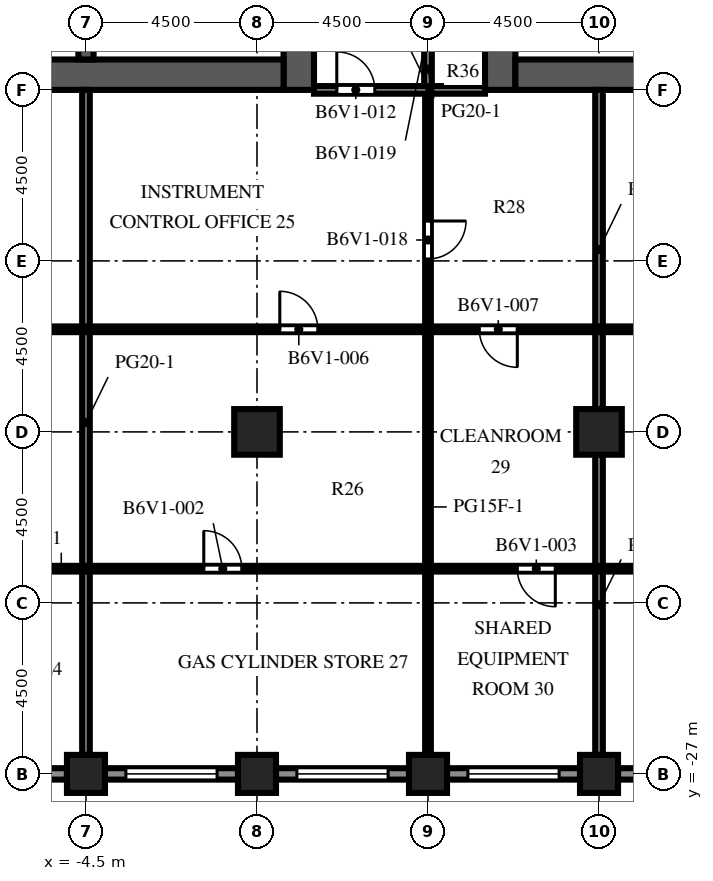
"""IFC4 building model, lengths in metres.
Left out: names, types, materials, properties, quantities, classifications, styles, units other than length and angle.
Written with IfcOpenShell. Run it as: python <this file> out.ifc"""

import sys

from ifc_helpers import new_model, si_unit, direction, frame, frame_2d, origin, origin_2d, place, context, subcontext, project, spatial, rectangle, extrude, element, fill, save


model = new_model("IFC4")
c1 = context("Model", 3, precision=1e-05, world=origin(), true_north=direction((0.0, 1.0)))
c2 = subcontext(c1, "Body", "Model", "MODEL_VIEW")
j1 = project(units=[si_unit("LENGTHUNIT", "METRE"), si_unit("PLANEANGLEUNIT", "RADIAN")], contexts=[c1])
p1 = place(None, origin())
s1 = spatial("IfcSite", under=j1, at=p1, CompositionType="ELEMENT")
p2 = place(p1, origin())
s2 = spatial("IfcBuilding", under=s1, at=p2, CompositionType="ELEMENT")
p3 = place(p2, frame((0.0, 0.0, 207.9)))
s3 = spatial("IfcBuildingStorey", under=s2, at=p3, CompositionType="ELEMENT", Elevation=207.9)
for number, where, z_axis, x_axis in (
    (1, (-4.5, -27.0, 0.0), (0.0, 0.0, 1.0), (1.0, 0.0, 0.0)),
    (2, (0.0, -27.0, 0.0), (0.0, 0.0, 1.0), (1.0, 0.0, 0.0)),
    (3, (4.5, -27.0, 0.0), (0.0, 0.0, 1.0), (1.0, 0.0, 0.0)),
    (4, (9.0, -27.0, 0.0), (0.0, 0.0, 1.0), (1.0, 0.0, 0.0)),
):
    element("IfcColumn", number, at=place(p3, frame(where, z_axis=z_axis, x_axis=x_axis)), inside=s3, PredefinedType="COLUMN", context=c2, shape_type="SweptSolid", body=[
        extrude(rectangle(XDim=1.0, YDim=1.0, at=origin_2d()), origin(), (0.0, 0.0, 1.0), 4.1),
    ])
for number, where, z_axis, x_axis in (
    (5, (0.0, -18.0, 0.0), (0.0, 0.0, 1.0), (1.0, 0.0, 0.0)),
    (6, (9.0, -18.0, 0.0), (0.0, 0.0, 1.0), (1.0, 0.0, 0.0)),
):
    element("IfcColumn", number, at=place(p3, frame(where, z_axis=z_axis, x_axis=x_axis)), inside=s3, PredefinedType="COLUMN", context=c2, shape_type="SweptSolid", body=[
        extrude(rectangle(XDim=1.2, YDim=1.2, at=origin_2d()), origin(), (0.0, 0.0, 1.0), 4.1),
    ])
p4 = place(p3, frame((1.1, -9.0, 0.0), z_axis=(0.0, 0.0, 1.0), x_axis=(0.0, 1.0, 0.0)))
e7 = element("IfcWall", 7, at=p4, inside=s3, PredefinedType="SHEAR", context=c2, shape_type="SweptSolid", body=[
    extrude(rectangle(XDim=27.5, YDim=0.8, at=frame_2d((13.75, 0.0))), origin(), (0.0, 0.0, 1.0), 4.1),
])
p5 = place(p4, frame((12.55, 0.0, 0.0)))
e8 = element("IfcOpeningElement", 8, at=p5, cuts=e7, PredefinedType="OPENING", context=c2, shape_type="SweptSolid", body=[
    extrude(rectangle(XDim=2.4, YDim=2.4, at=frame_2d((1.2, 1.2))), frame((0.0, 0.41, 0.0), z_axis=(0.0, -1.0, 0.0), x_axis=(1.0, 0.0, 0.0)), (0.0, 0.0, 1.0), 0.82),
])
p6 = place(p4, frame((3.95, 0.0, 0.0)))
e9 = element("IfcOpeningElement", 9, at=p6, cuts=e7, PredefinedType="OPENING", context=c2, shape_type="SweptSolid", body=[
    extrude(rectangle(XDim=1.2, YDim=2.1, at=frame_2d((0.6, 1.05))), frame((0.0, 0.41, 0.0), z_axis=(0.0, -1.0, 0.0), x_axis=(1.0, 0.0, 0.0)), (0.0, 0.0, 1.0), 0.82),
])
p7 = place(p4, frame((22.35, 0.0, 0.0)))
e10 = element("IfcOpeningElement", 10, at=p7, cuts=e7, PredefinedType="OPENING", context=c2, shape_type="SweptSolid", body=[
    extrude(rectangle(XDim=1.2, YDim=2.1, at=frame_2d((0.6, 1.05))), frame((0.0, 0.41, 0.0), z_axis=(0.0, -1.0, 0.0), x_axis=(1.0, 0.0, 0.0)), (0.0, 0.0, 1.0), 0.82),
])
p8 = place(p3, frame((-9.7, -8.6, 0.0), z_axis=(0.0, 0.0, 1.0), x_axis=(1.0, 0.0, 0.0)))
e11 = element("IfcWall", 11, at=p8, inside=s3, PredefinedType="SHEAR", context=c2, shape_type="SweptSolid", body=[
    extrude(rectangle(XDim=10.4, YDim=0.8, at=frame_2d((5.2, 0.0))), origin(), (0.0, 0.0, 1.0), 4.1),
])
p9 = place(p3, frame((-4.5, -8.2, 0.0), z_axis=(0.0, 0.0, 1.0), x_axis=(0.0, 1.0, 0.0)))
e12 = element("IfcWall", 12, at=p9, inside=s3, PredefinedType="SHEAR", context=c2, shape_type="SweptSolid", body=[
    extrude(rectangle(XDim=7.5, YDim=0.4, at=frame_2d((3.75, 0.0))), origin(), (0.0, 0.0, 1.0), 4.1),
])
p10 = place(p3, frame((6.4, -9.0, 0.0), z_axis=(0.0, 0.0, 1.0), x_axis=(0.0, 1.0, 0.0)))
e13 = element("IfcWall", 13, at=p10, inside=s3, PredefinedType="SHEAR", context=c2, shape_type="SweptSolid", body=[
    extrude(rectangle(XDim=27.5, YDim=0.8, at=frame_2d((13.75, 0.0))), origin(), (0.0, 0.0, 1.0), 4.1),
])
p11 = place(p10, frame((12.55, 0.0, 0.0)))
e14 = element("IfcOpeningElement", 14, at=p11, cuts=e13, PredefinedType="OPENING", context=c2, shape_type="SweptSolid", body=[
    extrude(rectangle(XDim=2.4, YDim=2.4, at=frame_2d((1.2, 1.2))), frame((0.0, 0.41, 0.0), z_axis=(0.0, -1.0, 0.0), x_axis=(1.0, 0.0, 0.0)), (0.0, 0.0, 1.0), 0.82),
])
p12 = place(p10, frame((3.95, 0.0, 0.0)))
e15 = element("IfcOpeningElement", 15, at=p12, cuts=e13, PredefinedType="OPENING", context=c2, shape_type="SweptSolid", body=[
    extrude(rectangle(XDim=1.2, YDim=2.1, at=frame_2d((0.6, 1.05))), frame((0.0, 0.41, 0.0), z_axis=(0.0, -1.0, 0.0), x_axis=(1.0, 0.0, 0.0)), (0.0, 0.0, 1.0), 0.82),
])
p13 = place(p10, frame((22.35, 0.0, 0.0)))
e16 = element("IfcOpeningElement", 16, at=p13, cuts=e13, PredefinedType="OPENING", context=c2, shape_type="SweptSolid", body=[
    extrude(rectangle(XDim=1.2, YDim=2.1, at=frame_2d((0.6, 1.05))), frame((0.0, 0.41, 0.0), z_axis=(0.0, -1.0, 0.0), x_axis=(1.0, 0.0, 0.0)), (0.0, 0.0, 1.0), 0.82),
])
p14 = place(p3, frame((6.8, -8.6, 0.0), z_axis=(0.0, 0.0, 1.0), x_axis=(1.0, 0.0, 0.0)))
e17 = element("IfcWall", 17, at=p14, inside=s3, PredefinedType="SHEAR", context=c2, shape_type="SweptSolid", body=[
    extrude(rectangle(XDim=10.4, YDim=0.8, at=frame_2d((5.2, 0.0))), origin(), (0.0, 0.0, 1.0), 4.1),
])
p15 = place(p3, frame((-5.0, -27.0, 0.0), z_axis=(0.0, 0.0, 1.0), x_axis=(-1.0, 0.0, 0.0)))
e18 = element("IfcWall", 18, at=p15, inside=s3, PredefinedType="SOLIDWALL", context=c2, shape_type="SweptSolid", body=[
    extrude(rectangle(XDim=3.5, YDim=0.3, at=frame_2d((1.75, 0.0))), origin(), (0.0, 0.0, 1.0), 2.85),
])
p16 = place(p15, frame((0.55, 0.0, 0.8)))
e19 = element("IfcOpeningElement", 19, at=p16, cuts=e18, PredefinedType="OPENING", context=c2, shape_type="SweptSolid", body=[
    extrude(rectangle(XDim=2.4, YDim=1.7, at=frame_2d((1.2, 0.85))), frame((0.0, 0.16, 0.0), z_axis=(0.0, -1.0, 0.0), x_axis=(1.0, 0.0, 0.0)), (0.0, 0.0, 1.0), 0.32),
])
p17 = place(p3, frame((-0.5, -27.0, 0.0), z_axis=(0.0, 0.0, 1.0), x_axis=(-1.0, 0.0, 0.0)))
e20 = element("IfcWall", 20, at=p17, inside=s3, PredefinedType="SOLIDWALL", context=c2, shape_type="SweptSolid", body=[
    extrude(rectangle(XDim=3.5, YDim=0.3, at=frame_2d((1.75, 0.0))), origin(), (0.0, 0.0, 1.0), 2.85),
])
p18 = place(p17, frame((0.55, 0.0, 0.8)))
e21 = element("IfcOpeningElement", 21, at=p18, cuts=e20, PredefinedType="OPENING", context=c2, shape_type="SweptSolid", body=[
    extrude(rectangle(XDim=2.4, YDim=1.7, at=frame_2d((1.2, 0.85))), frame((0.0, 0.16, 0.0), z_axis=(0.0, -1.0, 0.0), x_axis=(1.0, 0.0, 0.0)), (0.0, 0.0, 1.0), 0.32),
])
p19 = place(p3, frame((4.0, -27.0, 0.0), z_axis=(0.0, 0.0, 1.0), x_axis=(-1.0, 0.0, 0.0)))
e22 = element("IfcWall", 22, at=p19, inside=s3, PredefinedType="SOLIDWALL", context=c2, shape_type="SweptSolid", body=[
    extrude(rectangle(XDim=3.5, YDim=0.3, at=frame_2d((1.75, 0.0))), origin(), (0.0, 0.0, 1.0), 2.85),
])
p20 = place(p19, frame((0.55, 0.0, 0.8)))
e23 = element("IfcOpeningElement", 23, at=p20, cuts=e22, PredefinedType="OPENING", context=c2, shape_type="SweptSolid", body=[
    extrude(rectangle(XDim=2.4, YDim=1.7, at=frame_2d((1.2, 0.85))), frame((0.0, 0.16, 0.0), z_axis=(0.0, -1.0, 0.0), x_axis=(1.0, 0.0, 0.0)), (0.0, 0.0, 1.0), 0.32),
])
p21 = place(p3, frame((8.5, -27.0, 0.0), z_axis=(0.0, 0.0, 1.0), x_axis=(-1.0, 0.0, 0.0)))
e24 = element("IfcWall", 24, at=p21, inside=s3, PredefinedType="SOLIDWALL", context=c2, shape_type="SweptSolid", body=[
    extrude(rectangle(XDim=3.5, YDim=0.3, at=frame_2d((1.75, 0.0))), origin(), (0.0, 0.0, 1.0), 2.85),
])
p22 = place(p21, frame((0.55, 0.0, 0.8)))
e25 = element("IfcOpeningElement", 25, at=p22, cuts=e24, PredefinedType="OPENING", context=c2, shape_type="SweptSolid", body=[
    extrude(rectangle(XDim=2.4, YDim=1.7, at=frame_2d((1.2, 0.85))), frame((0.0, 0.16, 0.0), z_axis=(0.0, -1.0, 0.0), x_axis=(1.0, 0.0, 0.0)), (0.0, 0.0, 1.0), 0.32),
])
p23 = place(p3, frame((13.0, -27.0, 0.0), z_axis=(0.0, 0.0, 1.0), x_axis=(-1.0, 0.0, 0.0)))
e26 = element("IfcWall", 26, at=p23, inside=s3, PredefinedType="SOLIDWALL", context=c2, shape_type="SweptSolid", body=[
    extrude(rectangle(XDim=3.5, YDim=0.3, at=frame_2d((1.75, 0.0))), origin(), (0.0, 0.0, 1.0), 2.85),
])
p24 = place(p23, frame((0.55, 0.0, 0.8)))
e27 = element("IfcOpeningElement", 27, at=p24, cuts=e26, PredefinedType="OPENING", context=c2, shape_type="SweptSolid", body=[
    extrude(rectangle(XDim=2.4, YDim=1.7, at=frame_2d((1.2, 0.85))), frame((0.0, 0.16, 0.0), z_axis=(0.0, -1.0, 0.0), x_axis=(1.0, 0.0, 0.0)), (0.0, 0.0, 1.0), 0.32),
])
p25 = place(p3, frame((-0.8, -8.2, 0.0), z_axis=(0.0, 0.0, 1.0), x_axis=(0.0, 1.0, 0.0)))
e28 = element("IfcWall", 28, at=p25, inside=s3, PredefinedType="PARTITIONING", context=c2, shape_type="SweptSolid", body=[
    extrude(rectangle(XDim=2.25, YDim=0.1, at=frame_2d((1.125, 0.0))), origin(), (0.0, 0.0, 1.0), 3.65),
])
p26 = place(p25, frame((0.625, 0.0, 0.0)))
e29 = element("IfcOpeningElement", 29, at=p26, cuts=e28, PredefinedType="OPENING", context=c2, shape_type="SweptSolid", body=[
    extrude(rectangle(XDim=1.0, YDim=2.1, at=frame_2d((0.5, 1.05))), frame((0.0, 0.06, 0.0), z_axis=(0.0, -1.0, 0.0), x_axis=(1.0, 0.0, 0.0)), (0.0, 0.0, 1.0), 0.12),
])
p27 = place(p3, frame((8.3, -8.2, 0.0), z_axis=(0.0, 0.0, 1.0), x_axis=(0.0, 1.0, 0.0)))
e30 = element("IfcWall", 30, at=p27, inside=s3, PredefinedType="PARTITIONING", context=c2, shape_type="SweptSolid", body=[
    extrude(rectangle(XDim=2.25, YDim=0.1, at=frame_2d((1.125, 0.0))), origin(), (0.0, 0.0, 1.0), 3.65),
])
p28 = place(p27, frame((0.625, 0.0, 0.0)))
e31 = element("IfcOpeningElement", 31, at=p28, cuts=e30, PredefinedType="OPENING", context=c2, shape_type="SweptSolid", body=[
    extrude(rectangle(XDim=1.0, YDim=2.1, at=frame_2d((0.5, 1.05))), frame((0.0, 0.06, 0.0), z_axis=(0.0, -1.0, 0.0), x_axis=(1.0, 0.0, 0.0)), (0.0, 0.0, 1.0), 0.12),
])
p29 = place(p3, frame((-4.5, -26.5, 0.0), z_axis=(0.0, 0.0, 1.0), x_axis=(0.0, 1.0, 0.0)))
e32 = element("IfcWall", 32, at=p29, inside=s3, PredefinedType="PARTITIONING", context=c2, shape_type="SweptSolid", body=[
    extrude(rectangle(XDim=17.5, YDim=0.2, at=frame_2d((8.75, 0.0))), origin(), (0.0, 0.0, 1.0), 3.65),
])
p30 = place(p3, frame((4.5, -9.0, 0.0), z_axis=(0.0, 0.0, 1.0), x_axis=(0.0, -1.0, 0.0)))
e33 = element("IfcWall", 33, at=p30, inside=s3, PredefinedType="PARTITIONING", context=c2, shape_type="SweptSolid", body=[
    extrude(rectangle(XDim=17.5, YDim=0.15, at=frame_2d((8.75, 0.0))), origin(), (0.0, 0.0, 1.0), 3.65),
])
p31 = place(p30, frame((3.45, 0.0, 0.0)))
e34 = element("IfcOpeningElement", 34, at=p31, cuts=e33, PredefinedType="OPENING", context=c2, shape_type="SweptSolid", body=[
    extrude(rectangle(XDim=1.0, YDim=2.1, at=frame_2d((0.5, 1.05))), frame((0.0, 0.085, 0.0), z_axis=(0.0, -1.0, 0.0), x_axis=(1.0, 0.0, 0.0)), (0.0, 0.0, 1.0), 0.17),
])
p32 = place(p3, frame((4.5, -6.0, 0.0), z_axis=(0.0, 0.0, 1.0), x_axis=(0.0, -1.0, 0.0)))
e35 = element("IfcWall", 35, at=p32, inside=s3, PredefinedType="PARTITIONING", context=c2, shape_type="SweptSolid", body=[
    extrude(rectangle(XDim=3.0, YDim=0.2, at=frame_2d((1.5, 0.0))), origin(), (0.0, 0.0, 1.0), 3.65),
])
p33 = place(p32, frame((0.9, 0.0, 0.0)))
e36 = element("IfcOpeningElement", 36, at=p33, cuts=e35, PredefinedType="OPENING", context=c2, shape_type="SweptSolid", body=[
    extrude(rectangle(XDim=1.0, YDim=2.1, at=frame_2d((0.5, 1.05))), frame((0.0, 0.11, 0.0), z_axis=(0.0, -1.0, 0.0), x_axis=(1.0, 0.0, 0.0)), (0.0, 0.0, 1.0), 0.22),
])
p34 = place(p3, frame((9.0, -26.5, 0.0), z_axis=(0.0, 0.0, 1.0), x_axis=(0.0, 1.0, 0.0)))
e37 = element("IfcWall", 37, at=p34, inside=s3, PredefinedType="PARTITIONING", context=c2, shape_type="SweptSolid", body=[
    extrude(rectangle(XDim=7.9, YDim=0.2, at=frame_2d((3.95, 0.0))), origin(), (0.0, 0.0, 1.0), 3.65),
])
p35 = place(p3, frame((9.0, -17.4, 0.0), z_axis=(0.0, 0.0, 1.0), x_axis=(0.0, 1.0, 0.0)))
e38 = element("IfcWall", 38, at=p35, inside=s3, PredefinedType="PARTITIONING", context=c2, shape_type="SweptSolid", body=[
    extrude(rectangle(XDim=8.4, YDim=0.2, at=frame_2d((4.2, 0.0))), origin(), (0.0, 0.0, 1.0), 3.65),
])
p36 = place(p3, frame((21.0, -21.6, 0.0), z_axis=(0.0, 0.0, 1.0), x_axis=(-1.0, 0.0, 0.0)))
e39 = element("IfcWall", 39, at=p36, inside=s3, PredefinedType="PARTITIONING", context=c2, shape_type="SweptSolid", body=[
    extrude(rectangle(XDim=34.5, YDim=0.15, at=frame_2d((17.25, 0.0))), origin(), (0.0, 0.0, 1.0), 3.65),
])
p37 = place(p36, frame((29.9, 0.0, 0.0)))
e40 = element("IfcOpeningElement", 40, at=p37, cuts=e39, PredefinedType="OPENING", context=c2, shape_type="SweptSolid", body=[
    extrude(rectangle(XDim=1.0, YDim=2.1, at=frame_2d((0.5, 1.05))), frame((0.0, 0.085, 0.0), z_axis=(0.0, -1.0, 0.0), x_axis=(1.0, 0.0, 0.0)), (0.0, 0.0, 1.0), 0.17),
])
p38 = place(p36, frame((21.4, 0.0, 0.0)))
e41 = element("IfcOpeningElement", 41, at=p38, cuts=e39, PredefinedType="OPENING", context=c2, shape_type="SweptSolid", body=[
    extrude(rectangle(XDim=1.0, YDim=2.1, at=frame_2d((0.5, 1.05))), frame((0.0, 0.085, 0.0), z_axis=(0.0, -1.0, 0.0), x_axis=(1.0, 0.0, 0.0)), (0.0, 0.0, 1.0), 0.17),
])
p39 = place(p36, frame((13.15, 0.0, 0.0)))
e42 = element("IfcOpeningElement", 42, at=p39, cuts=e39, PredefinedType="OPENING", context=c2, shape_type="SweptSolid", body=[
    extrude(rectangle(XDim=1.0, YDim=2.1, at=frame_2d((0.5, 1.05))), frame((0.0, 0.085, 0.0), z_axis=(0.0, -1.0, 0.0), x_axis=(1.0, 0.0, 0.0)), (0.0, 0.0, 1.0), 0.17),
])
p40 = place(p36, frame((5.15, 0.0, 0.0)))
e43 = element("IfcOpeningElement", 43, at=p40, cuts=e39, PredefinedType="OPENING", context=c2, shape_type="SweptSolid", body=[
    extrude(rectangle(XDim=1.0, YDim=2.1, at=frame_2d((0.5, 1.05))), frame((0.0, 0.085, 0.0), z_axis=(0.0, -1.0, 0.0), x_axis=(1.0, 0.0, 0.0)), (0.0, 0.0, 1.0), 0.17),
])
p41 = place(p3, frame((21.0, -15.3, 0.0), z_axis=(0.0, 0.0, 1.0), x_axis=(-1.0, 0.0, 0.0)))
e44 = element("IfcWall", 44, at=p41, inside=s3, PredefinedType="PARTITIONING", context=c2, shape_type="SweptSolid", body=[
    extrude(rectangle(XDim=34.5, YDim=0.15, at=frame_2d((17.25, 0.0))), origin(), (0.0, 0.0, 1.0), 3.65),
])
p42 = place(p41, frame((28.9, 0.0, 0.0)))
e45 = element("IfcOpeningElement", 45, at=p42, cuts=e44, PredefinedType="OPENING", context=c2, shape_type="SweptSolid", body=[
    extrude(rectangle(XDim=1.0, YDim=2.1, at=frame_2d((0.5, 1.05))), frame((0.0, 0.085, 0.0), z_axis=(0.0, -1.0, 0.0), x_axis=(1.0, 0.0, 0.0)), (0.0, 0.0, 1.0), 0.17),
])
p43 = place(p41, frame((19.4, 0.0, 0.0)))
e46 = element("IfcOpeningElement", 46, at=p43, cuts=e44, PredefinedType="OPENING", context=c2, shape_type="SweptSolid", body=[
    extrude(rectangle(XDim=1.0, YDim=2.1, at=frame_2d((0.5, 1.05))), frame((0.0, 0.085, 0.0), z_axis=(0.0, -1.0, 0.0), x_axis=(1.0, 0.0, 0.0)), (0.0, 0.0, 1.0), 0.17),
])
p44 = place(p41, frame((14.15, 0.0, 0.0)))
e47 = element("IfcOpeningElement", 47, at=p44, cuts=e44, PredefinedType="OPENING", context=c2, shape_type="SweptSolid", body=[
    extrude(rectangle(XDim=1.0, YDim=2.1, at=frame_2d((0.5, 1.05))), frame((0.0, 0.085, 0.0), z_axis=(0.0, -1.0, 0.0), x_axis=(1.0, 0.0, 0.0)), (0.0, 0.0, 1.0), 0.17),
])
p45 = place(p41, frame((3.9, 0.0, 0.0)))
e48 = element("IfcOpeningElement", 48, at=p45, cuts=e44, PredefinedType="OPENING", context=c2, shape_type="SweptSolid", body=[
    extrude(rectangle(XDim=1.0, YDim=2.1, at=frame_2d((0.5, 1.05))), frame((0.0, 0.085, 0.0), z_axis=(0.0, -1.0, 0.0), x_axis=(1.0, 0.0, 0.0)), (0.0, 0.0, 1.0), 0.17),
])
p46 = place(p3, frame((6.0, -9.0, 0.0), z_axis=(0.0, 0.0, 1.0), x_axis=(-1.0, 0.0, 0.0)))
e49 = element("IfcWall", 49, at=p46, inside=s3, PredefinedType="PARTITIONING", context=c2, shape_type="SweptSolid", body=[
    extrude(rectangle(XDim=4.5, YDim=0.2, at=frame_2d((2.25, 0.0))), origin(), (0.0, 0.0, 1.0), 3.65),
])
p47 = place(p46, frame((2.9, 0.0, 0.0)))
e50 = element("IfcOpeningElement", 50, at=p47, cuts=e49, PredefinedType="OPENING", context=c2, shape_type="SweptSolid", body=[
    extrude(rectangle(XDim=1.0, YDim=2.1, at=frame_2d((0.5, 1.05))), frame((0.0, 0.11, 0.0), z_axis=(0.0, -1.0, 0.0), x_axis=(1.0, 0.0, 0.0)), (0.0, 0.0, 1.0), 0.22),
])
p48 = place(p18, origin())
e51 = element("IfcWindow", 51, at=p48, inside=s3, PartitioningType="SINGLE_PANEL", PredefinedType="WINDOW", context=c2, shape_type="SweptSolid", body=[
    extrude(rectangle(XDim=2.4, YDim=1.7, at=frame_2d((1.2, 0.85))), frame((0.0, 0.03, 0.0), z_axis=(0.0, -1.0, 0.0), x_axis=(1.0, 0.0, 0.0)), (0.0, 0.0, 1.0), 0.06),
])
fill(e21, e51)
p49 = place(p20, origin())
e52 = element("IfcWindow", 52, at=p49, inside=s3, PartitioningType="SINGLE_PANEL", PredefinedType="WINDOW", context=c2, shape_type="SweptSolid", body=[
    extrude(rectangle(XDim=2.4, YDim=1.7, at=frame_2d((1.2, 0.85))), frame((0.0, 0.03, 0.0), z_axis=(0.0, -1.0, 0.0), x_axis=(1.0, 0.0, 0.0)), (0.0, 0.0, 1.0), 0.06),
])
fill(e23, e52)
p50 = place(p22, origin())
e53 = element("IfcWindow", 53, at=p50, inside=s3, PartitioningType="SINGLE_PANEL", PredefinedType="WINDOW", context=c2, shape_type="SweptSolid", body=[
    extrude(rectangle(XDim=2.4, YDim=1.7, at=frame_2d((1.2, 0.85))), frame((0.0, 0.03, 0.0), z_axis=(0.0, -1.0, 0.0), x_axis=(1.0, 0.0, 0.0)), (0.0, 0.0, 1.0), 0.06),
])
fill(e25, e53)
p51 = place(p38, origin())
e54 = element("IfcDoor", 54, at=p51, inside=s3, OperationType="SINGLE_SWING_RIGHT", PredefinedType="DOOR", context=c2, shape_type="SweptSolid", body=[
    extrude(rectangle(XDim=1.0, YDim=2.1, at=frame_2d((0.5, 1.05))), frame((0.0, 0.025, 0.0), z_axis=(0.0, -1.0, 0.0), x_axis=(1.0, 0.0, 0.0)), (0.0, 0.0, 1.0), 0.05),
])
fill(e41, e54)
p52 = place(p39, origin())
e55 = element("IfcDoor", 55, at=p52, inside=s3, OperationType="SINGLE_SWING_LEFT", PredefinedType="DOOR", context=c2, shape_type="SweptSolid", body=[
    extrude(rectangle(XDim=1.0, YDim=2.1, at=frame_2d((0.5, 1.05))), frame((0.0, 0.025, 0.0), z_axis=(0.0, -1.0, 0.0), x_axis=(1.0, 0.0, 0.0)), (0.0, 0.0, 1.0), 0.05),
])
fill(e42, e55)
p53 = place(p43, origin())
e56 = element("IfcDoor", 56, at=p53, inside=s3, OperationType="SINGLE_SWING_RIGHT", PredefinedType="DOOR", context=c2, shape_type="SweptSolid", body=[
    extrude(rectangle(XDim=1.0, YDim=2.1, at=frame_2d((0.5, 1.05))), frame((0.0, 0.025, 0.0), z_axis=(0.0, -1.0, 0.0), x_axis=(1.0, 0.0, 0.0)), (0.0, 0.0, 1.0), 0.05),
])
fill(e46, e56)
p54 = place(p44, origin())
e57 = element("IfcDoor", 57, at=p54, inside=s3, OperationType="SINGLE_SWING_LEFT", PredefinedType="DOOR", context=c2, shape_type="SweptSolid", body=[
    extrude(rectangle(XDim=1.0, YDim=2.1, at=frame_2d((0.5, 1.05))), frame((0.0, 0.025, 0.0), z_axis=(0.0, -1.0, 0.0), x_axis=(1.0, 0.0, 0.0)), (0.0, 0.0, 1.0), 0.05),
])
fill(e47, e57)
p55 = place(p47, origin())
e58 = element("IfcDoor", 58, at=p55, inside=s3, OperationType="SINGLE_SWING_RIGHT", PredefinedType="DOOR", context=c2, shape_type="SweptSolid", body=[
    extrude(rectangle(XDim=1.0, YDim=2.1, at=frame_2d((0.5, 1.05))), frame((0.0, 0.025, 0.0), z_axis=(0.0, -1.0, 0.0), x_axis=(1.0, 0.0, 0.0)), (0.0, 0.0, 1.0), 0.05),
])
fill(e50, e58)
p56 = place(p31, origin())
e59 = element("IfcDoor", 59, at=p56, inside=s3, OperationType="SINGLE_SWING_LEFT", PredefinedType="DOOR", context=c2, shape_type="SweptSolid", body=[
    extrude(rectangle(XDim=1.0, YDim=2.1, at=frame_2d((0.5, 1.05))), frame((0.0, 0.025, 0.0), z_axis=(0.0, -1.0, 0.0), x_axis=(1.0, 0.0, 0.0)), (0.0, 0.0, 1.0), 0.05),
])
fill(e34, e59)
save(model, sys.argv[1])
